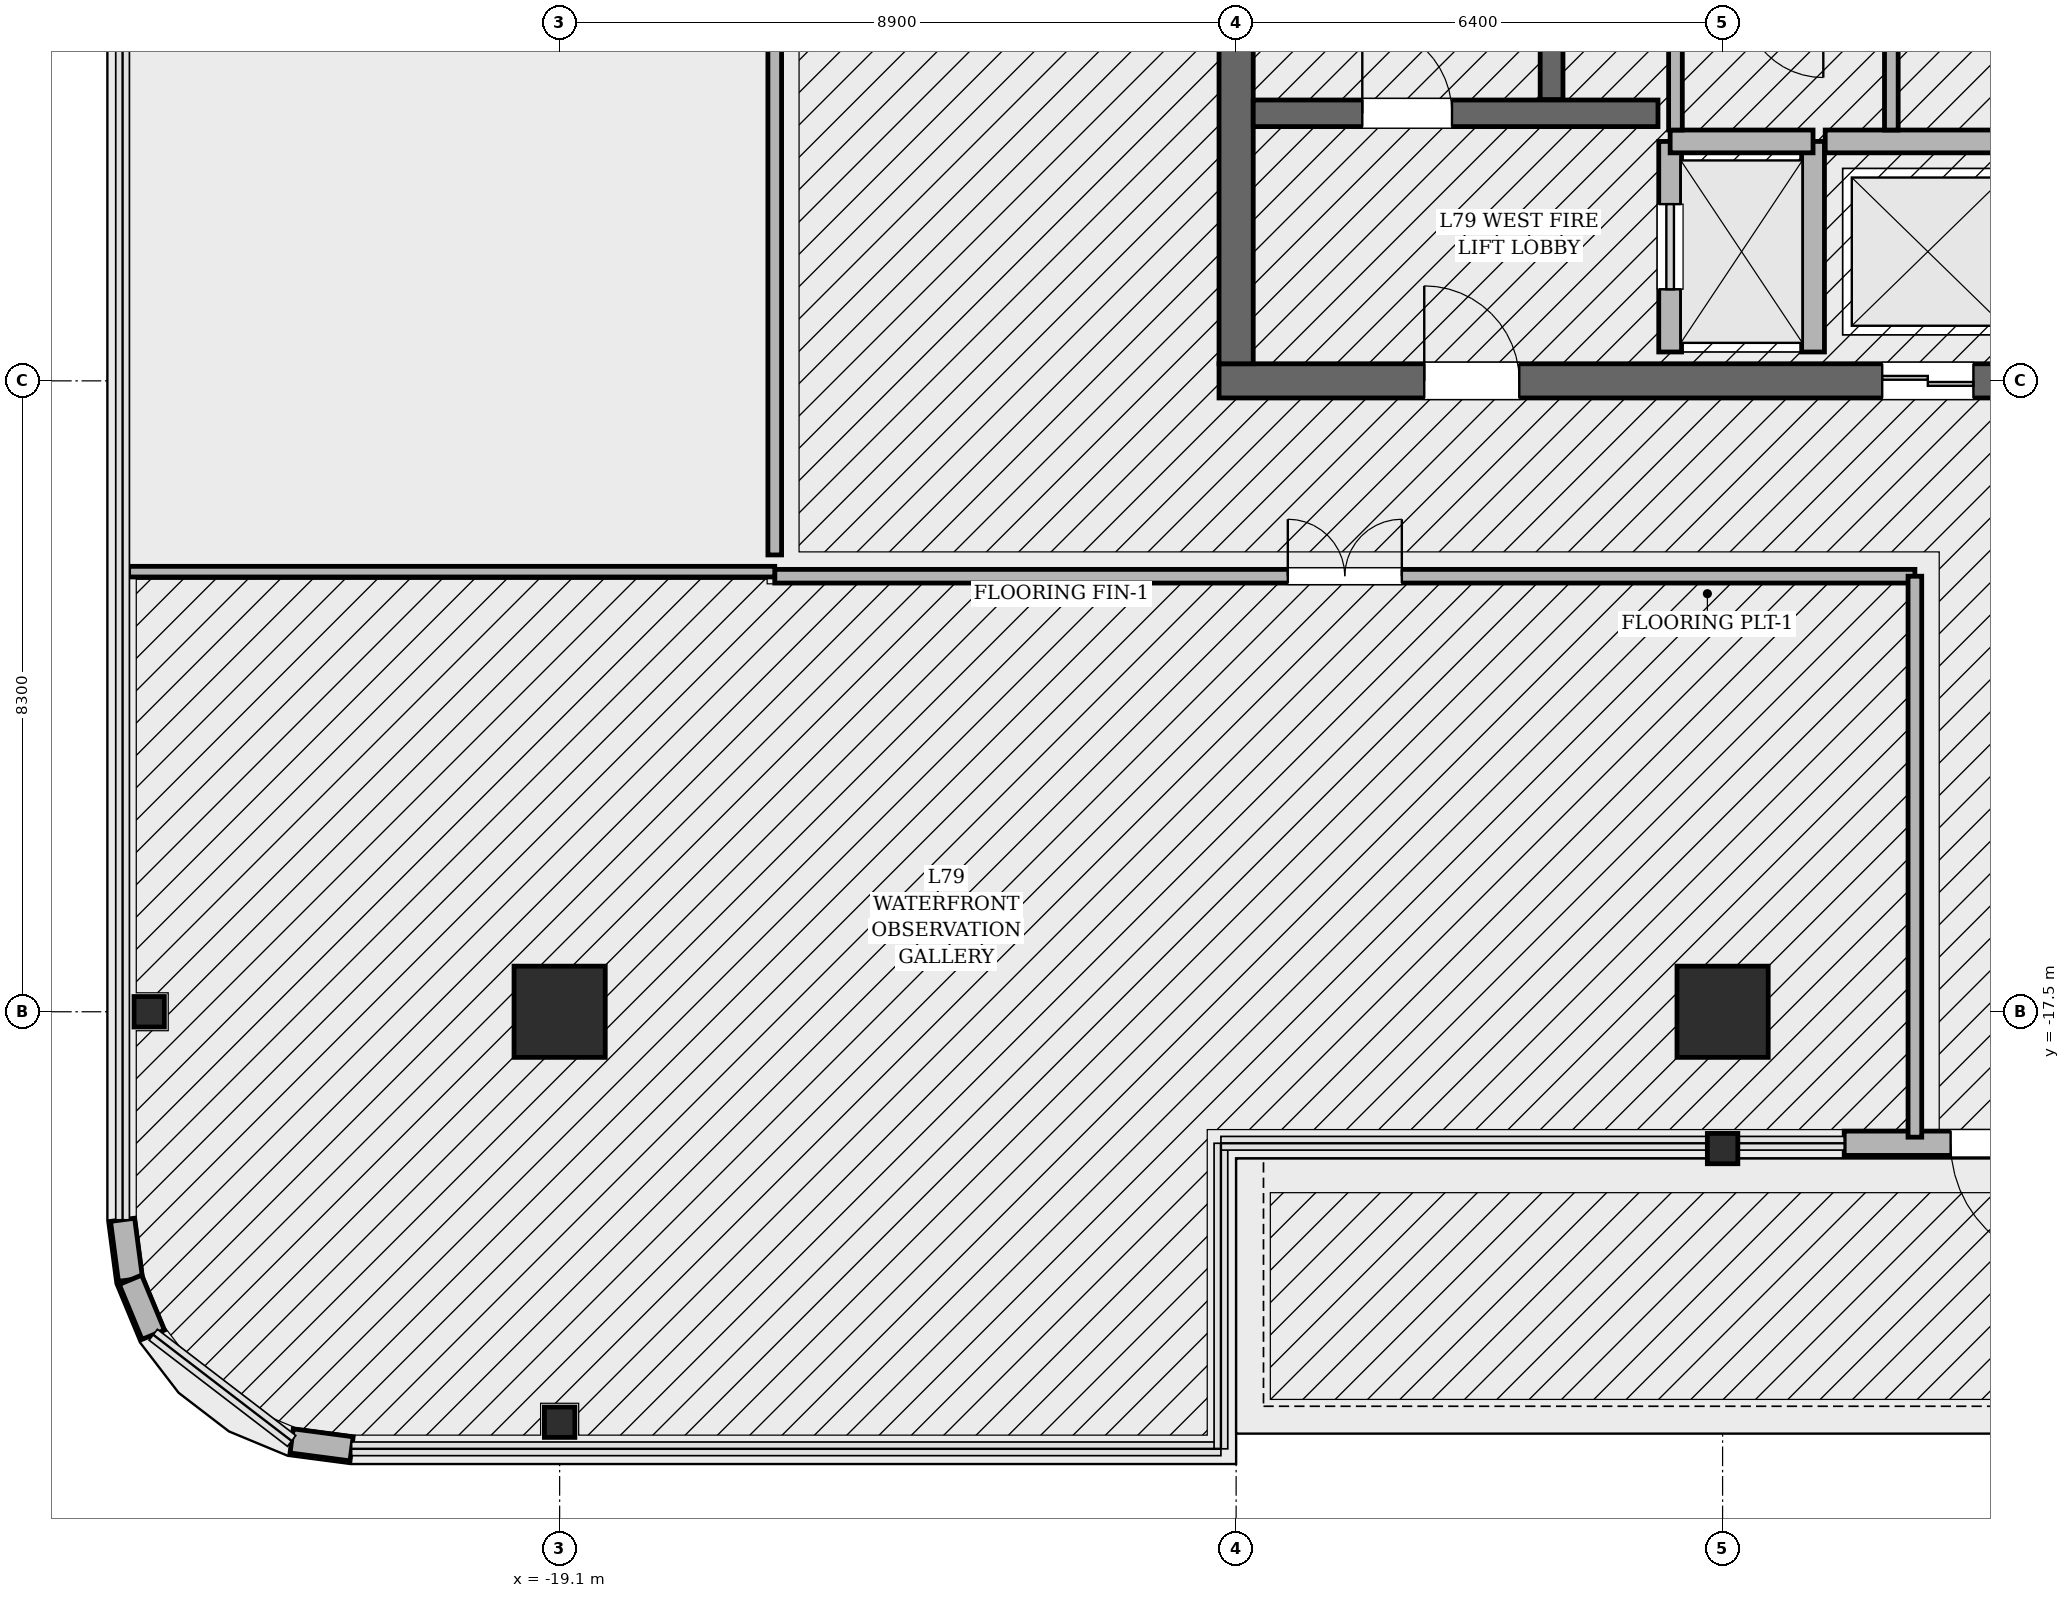
"""IFC4 building model, lengths in metres.
Left out: names, types, materials, properties, quantities, classifications, styles, units other than length and angle.
Written with IfcOpenShell. Run it as: python <this file> out.ifc"""

import sys

from ifc_helpers import new_model, si_unit, direction, frame, frame_2d, origin, origin_2d, place, context, subcontext, project, spatial, rectangle, hollow_rectangle, i_section, extrude, element, fill, save


model = new_model("IFC4")
c1 = context("Model", 3, precision=1e-05, world=origin(), true_north=direction((0.0, 1.0)))
c2 = subcontext(c1, "Body", "Model", "MODEL_VIEW")
j1 = project(units=[si_unit("LENGTHUNIT", "METRE"), si_unit("PLANEANGLEUNIT", "RADIAN")], contexts=[c1])
p1 = place(None, origin())
s1 = spatial("IfcSite", under=j1, at=p1, CompositionType="ELEMENT")
p2 = place(p1, origin())
s2 = spatial("IfcBuilding", under=s1, at=p2, CompositionType="ELEMENT")
p3 = place(p2, frame((0.0, 0.0, 334.2)))
s3 = spatial("IfcBuildingStorey", under=s2, at=p3, CompositionType="ELEMENT", Elevation=334.2)
p4 = place(p3, frame((10.425, -9.2, 0.0), z_axis=(0.0, 0.0, 1.0), x_axis=(-1.0, 0.0, 0.0)))
e1 = element("IfcWall", 1, at=p4, inside=s3, PredefinedType="SHEAR", context=c2, shape_type="SweptSolid", body=[
    extrude(rectangle(XDim=20.85, YDim=0.45, at=frame_2d((10.425, 0.0))), origin(), (0.0, 0.0, 1.0), 4.8),
])
p5 = place(p4, frame((2.7, 0.0, 0.0)))
e2 = element("IfcOpeningElement", 2, at=p5, cuts=e1, PredefinedType="OPENING", context=c2, shape_type="SweptSolid", body=[
    extrude(rectangle(XDim=1.25, YDim=2.25, at=frame_2d((0.625, 1.125))), frame((0.0, 0.235, 0.0), z_axis=(0.0, -1.0, 0.0), x_axis=(1.0, 0.0, 0.0)), (0.0, 0.0, 1.0), 0.47),
])
p6 = place(p4, frame((16.9, 0.0, 0.0)))
e3 = element("IfcOpeningElement", 3, at=p6, cuts=e1, PredefinedType="OPENING", context=c2, shape_type="SweptSolid", body=[
    extrude(rectangle(XDim=1.25, YDim=2.25, at=frame_2d((0.625, 1.125))), frame((0.0, 0.235, 0.0), z_axis=(0.0, -1.0, 0.0), x_axis=(1.0, 0.0, 0.0)), (0.0, 0.0, 1.0), 0.47),
])
p7 = place(p4, frame((10.925, 0.0, 0.0)))
e4 = element("IfcOpeningElement", 4, at=p7, cuts=e1, PredefinedType="OPENING", context=c2, shape_type="SweptSolid", body=[
    extrude(rectangle(XDim=1.2, YDim=2.3, at=frame_2d((0.6, 1.15))), frame((0.0, 0.235, 0.0), z_axis=(0.0, -1.0, 0.0), x_axis=(1.0, 0.0, 0.0)), (0.0, 0.0, 1.0), 0.47),
])
p8 = place(p4, frame((8.725, 0.0, 0.0)))
e5 = element("IfcOpeningElement", 5, at=p8, cuts=e1, PredefinedType="OPENING", context=c2, shape_type="SweptSolid", body=[
    extrude(rectangle(XDim=1.2, YDim=2.3, at=frame_2d((0.6, 1.15))), frame((0.0, 0.235, 0.0), z_axis=(0.0, -1.0, 0.0), x_axis=(1.0, 0.0, 0.0)), (0.0, 0.0, 1.0), 0.47),
])
p9 = place(p3, frame((-10.2, -8.975, 0.0), z_axis=(0.0, 0.0, 1.0), x_axis=(0.0, 1.0, 0.0)))
e6 = element("IfcWall", 6, at=p9, inside=s3, PredefinedType="SHEAR", context=c2, shape_type="SweptSolid", body=[
    extrude(rectangle(XDim=17.95, YDim=0.45, at=frame_2d((8.975, 0.0))), origin(), (0.0, 0.0, 1.0), 4.8),
])
p10 = place(p9, frame((12.765, 0.0, 0.0)))
e7 = element("IfcOpeningElement", 7, at=p10, cuts=e6, PredefinedType="OPENING", context=c2, shape_type="SweptSolid", body=[
    extrude(rectangle(XDim=1.18, YDim=2.2, at=frame_2d((0.59, 1.1))), frame((0.0, 0.235, 0.0), z_axis=(0.0, -1.0, 0.0), x_axis=(1.0, 0.0, 0.0)), (0.0, 0.0, 1.0), 0.47),
])
p11 = place(p3, frame((-6.05, -5.5, 0.0), z_axis=(0.0, 0.0, 1.0), x_axis=(0.0, 1.0, 0.0)))
e8 = element("IfcWall", 8, at=p11, inside=s3, PredefinedType="SOLIDWALL", context=c2, shape_type="SweptSolid", body=[
    extrude(rectangle(XDim=8.95, YDim=0.3, at=frame_2d((4.475, 0.0))), origin(), (0.0, 0.0, 1.0), 4.8),
])
p12 = place(p3, frame((-9.975, -5.68, 0.0), z_axis=(0.0, 0.0, 1.0), x_axis=(1.0, 0.0, 0.0)))
e9 = element("IfcWall", 9, at=p12, inside=s3, PredefinedType="SOLIDWALL", context=c2, shape_type="SweptSolid", body=[
    extrude(rectangle(XDim=5.325, YDim=0.35, at=frame_2d((2.663, 0.0))), origin(), (0.0, 0.0, 1.0), 4.8),
])
p13 = place(p12, frame((1.435, 0.0, 0.0)))
e10 = element("IfcOpeningElement", 10, at=p13, cuts=e9, PredefinedType="OPENING", context=c2, shape_type="SweptSolid", body=[
    extrude(rectangle(XDim=1.18, YDim=2.2, at=frame_2d((0.59, 1.1))), frame((0.0, 0.185, 0.0), z_axis=(0.0, -1.0, 0.0), x_axis=(1.0, 0.0, 0.0)), (0.0, 0.0, 1.0), 0.37),
])
for number, where, z_axis, x_axis in (
    (11, (-19.1, -17.5, 0.0), (0.0, 0.0, 1.0), (1.0, 0.0, 0.0)),
    (12, (-3.8, -17.5, 0.0), (0.0, 0.0, 1.0), (1.0, 0.0, 0.0)),
):
    element("IfcColumn", number, at=place(p3, frame(where, z_axis=z_axis, x_axis=x_axis)), inside=s3, PredefinedType="COLUMN", context=c2, shape_type="SweptSolid", body=[
        extrude(hollow_rectangle(XDim=1.2, YDim=1.2, WallThickness=0.035, at=origin_2d()), origin(), (0.0, 0.0, 1.0), 4.8),
    ])
for number, where, z_axis, x_axis in (
    (13, (-19.1, -22.9, 0.0), (0.0, 0.0, 1.0), (1.0, 0.0, 0.0)),
    (14, (-3.8, -19.3, 0.0), (0.0, 0.0, 1.0), (1.0, 0.0, 0.0)),
    (15, (-24.5, -17.5, 0.0), (0.0, 0.0, 1.0), (0.0, 1.0, 0.0)),
):
    element("IfcColumn", number, at=place(p3, frame(where, z_axis=z_axis, x_axis=x_axis)), inside=s3, PredefinedType="COLUMN", context=c2, shape_type="SweptSolid", body=[
        extrude(i_section(OverallWidth=0.401, OverallDepth=0.399, WebThickness=0.025, FlangeThickness=0.04, FilletRadius=0.018, at=origin_2d()), origin(), (0.0, 0.0, 1.0), 4.798),
    ])
p14 = place(p3, frame((-22.626, -23.146, 0.0), z_axis=(0.0, 0.0, 1.0), x_axis=(0.991425036208, -0.130676691035, 0.0)))
e16 = element("IfcWall", 16, at=p14, inside=s3, PredefinedType="SOLIDWALL", context=c2, shape_type="SweptSolid", body=[
    extrude(rectangle(XDim=0.796, YDim=0.32, at=frame_2d((0.398, 0.0))), origin(), (0.0, 0.0, 1.0), 4.54),
])
p15 = place(p3, frame((-2.2, -19.23, 0.0), z_axis=(0.0, 0.0, 1.0), x_axis=(1.0, 0.0, 0.0)))
e17 = element("IfcWall", 17, at=p15, inside=s3, PredefinedType="SOLIDWALL", context=c2, shape_type="SweptSolid", body=[
    extrude(rectangle(XDim=4.4, YDim=0.32, at=frame_2d((2.2, 0.0))), origin(), (0.0, 0.0, 1.0), 4.54),
])
p16 = place(p15, frame((1.4, 0.0, 0.0)))
e18 = element("IfcOpeningElement", 18, at=p16, cuts=e17, PredefinedType="OPENING", context=c2, shape_type="SweptSolid", body=[
    extrude(rectangle(XDim=1.6, YDim=2.35, at=frame_2d((0.8, 1.175))), frame((0.0, 0.17, 0.0), z_axis=(0.0, -1.0, 0.0), x_axis=(1.0, 0.0, 0.0)), (0.0, 0.0, 1.0), 0.34),
])
p17 = place(p3, frame((-24.85, -20.237, 0.0), z_axis=(0.0, 0.0, 1.0), x_axis=(0.130676691035, -0.991425036208, 0.0)))
e19 = element("IfcWall", 19, at=p17, inside=s3, PredefinedType="SOLIDWALL", context=c2, shape_type="SweptSolid", body=[
    extrude(rectangle(XDim=0.796, YDim=0.32, at=frame_2d((0.398, 0.0))), origin(), (0.0, 0.0, 1.0), 4.54),
])
p18 = place(p3, frame((-24.746, -21.026, 0.0), z_axis=(0.0, 0.0, 1.0), x_axis=(0.38270990292, -0.923868567604, 0.0)))
e20 = element("IfcWall", 20, at=p18, inside=s3, PredefinedType="SOLIDWALL", context=c2, shape_type="SweptSolid", body=[
    extrude(rectangle(XDim=0.783, YDim=0.32, at=frame_2d((0.391, 0.0))), origin(), (0.0, 0.0, 1.0), 4.54),
])
p19 = place(p3, frame((-4.49, -8.82, 0.0), z_axis=(0.0, 0.0, 1.0), x_axis=(0.0, 1.0, 0.0)))
e21 = element("IfcWall", 21, at=p19, inside=s3, PredefinedType="SOLIDWALL", context=c2, shape_type="SweptSolid", body=[
    extrude(rectangle(XDim=2.77, YDim=0.3, at=frame_2d((1.385, 0.0))), origin(), (0.0, 0.0, 1.0), 4.54),
])
p20 = place(p19, frame((0.825, 0.0, 0.0)))
e22 = element("IfcOpeningElement", 22, at=p20, cuts=e21, PredefinedType="OPENING", context=c2, shape_type="SweptSolid", body=[
    extrude(rectangle(XDim=1.12, YDim=2.25, at=frame_2d((0.56, 1.125))), frame((0.0, 0.16, 0.0), z_axis=(0.0, -1.0, 0.0), x_axis=(1.0, 0.0, 0.0)), (0.0, 0.0, 1.0), 0.32),
])
p21 = place(p3, frame((-2.61, -8.82, 0.0), z_axis=(0.0, 0.0, 1.0), x_axis=(0.0, 1.0, 0.0)))
e23 = element("IfcWall", 23, at=p21, inside=s3, PredefinedType="SOLIDWALL", context=c2, shape_type="SweptSolid", body=[
    extrude(rectangle(XDim=2.77, YDim=0.3, at=frame_2d((1.385, 0.0))), origin(), (0.0, 0.0, 1.0), 4.54),
])
p22 = place(p3, frame((-4.49, -6.05, 0.0), z_axis=(0.0, 0.0, 1.0), x_axis=(1.0, 0.0, 0.0)))
e24 = element("IfcWall", 24, at=p22, inside=s3, PredefinedType="SOLIDWALL", context=c2, shape_type="SweptSolid", body=[
    extrude(rectangle(XDim=1.88, YDim=0.3, at=frame_2d((0.94, 0.0))), origin(), (0.0, 0.0, 1.0), 4.54),
])
p23 = place(p3, frame((-2.45, -6.05, 0.0), z_axis=(0.0, 0.0, 1.0), x_axis=(1.0, 0.0, 0.0)))
e25 = element("IfcWall", 25, at=p23, inside=s3, PredefinedType="SOLIDWALL", context=c2, shape_type="SweptSolid", body=[
    extrude(rectangle(XDim=4.9, YDim=0.3, at=frame_2d((2.45, 0.0))), origin(), (0.0, 0.0, 1.0), 4.54),
])
for number, where, z_axis, x_axis in (
    (26, (-1.58, -5.9, 0.0), (0.0, 0.0, 1.0), (0.0, 1.0, 0.0)),
    (27, (-4.42, -4.16, 0.0), (0.0, 0.0, 1.0), (0.0, -1.0, 0.0)),
):
    element("IfcWall", number, at=place(p3, frame(where, z_axis=z_axis, x_axis=x_axis)), inside=s3, PredefinedType="PARTITIONING", context=c2, shape_type="SweptSolid", body=[
        extrude(rectangle(XDim=1.74, YDim=0.18, at=frame_2d((0.87, 0.0))), origin(), (0.0, 0.0, 1.0), 4.54),
    ])
p24 = place(p3, frame((-16.27, -11.77, 0.0), z_axis=(0.0, 0.0, 1.0), x_axis=(1.0, 0.0, 0.0)))
e28 = element("IfcWall", 28, at=p24, inside=s3, PredefinedType="PARTITIONING", context=c2, shape_type="SweptSolid", body=[
    extrude(rectangle(XDim=15.0, YDim=0.18, at=frame_2d((7.5, 0.0))), origin(), (0.0, 0.0, 1.0), 3.214),
])
p25 = place(p24, frame((6.75, 0.0, 0.0)))
e29 = element("IfcOpeningElement", 29, at=p25, cuts=e28, PredefinedType="OPENING", context=c2, shape_type="SweptSolid", body=[
    extrude(rectangle(XDim=1.5, YDim=2.3, at=frame_2d((0.75, 1.15))), frame((0.0, 0.1, 0.0), z_axis=(0.0, -1.0, 0.0), x_axis=(1.0, 0.0, 0.0)), (0.0, 0.0, 1.0), 0.2),
])
p26 = place(p3, frame((-1.27, -11.77, 0.0), z_axis=(0.0, 0.0, 1.0), x_axis=(0.0, -1.0, 0.0)))
e30 = element("IfcWall", 30, at=p26, inside=s3, PredefinedType="PARTITIONING", context=c2, shape_type="SweptSolid", body=[
    extrude(rectangle(XDim=7.38, YDim=0.18, at=frame_2d((3.69, 0.0))), origin(), (0.0, 0.0, 1.0), 3.214),
])
p27 = place(p3, frame((-24.77, -11.71, 0.0), z_axis=(0.0, 0.0, 1.0), x_axis=(1.0, 0.0, 0.0)))
e31 = element("IfcWall", 31, at=p27, inside=s3, PredefinedType="PARTITIONING", context=c2, shape_type="SweptSolid", body=[
    extrude(rectangle(XDim=8.5, YDim=0.14, at=frame_2d((4.25, 0.0))), origin(), (0.0, 0.0, 1.0), 3.214),
])
p28 = place(p3, frame((-16.27, 13.82, 0.0), z_axis=(0.0, 0.0, 1.0), x_axis=(0.0, -1.0, 0.0)))
e32 = element("IfcWall", 32, at=p28, inside=s3, PredefinedType="PARTITIONING", context=c2, shape_type="SweptSolid", body=[
    extrude(rectangle(XDim=25.31, YDim=0.18, at=frame_2d((12.655, 0.0))), origin(), (0.0, 0.0, 1.0), 3.214),
])
p29 = place(p28, frame((12.13, 0.0, 0.0)))
e33 = element("IfcOpeningElement", 33, at=p29, cuts=e32, PredefinedType="OPENING", context=c2, shape_type="SweptSolid", body=[
    extrude(rectangle(XDim=1.05, YDim=2.2, at=frame_2d((0.525, 1.1))), frame((0.0, 0.1, 0.0), z_axis=(0.0, -1.0, 0.0), x_axis=(1.0, 0.0, 0.0)), (0.0, 0.0, 1.0), 0.2),
])
p30 = place(p16, origin())
e34 = element("IfcDoor", 34, at=p30, inside=s3, OperationType="SINGLE_SWING_RIGHT", PredefinedType="DOOR", context=c2, shape_type="SweptSolid", body=[
    extrude(rectangle(XDim=1.6, YDim=2.35, at=frame_2d((0.8, 1.175))), frame((0.0, 0.025, 0.0), z_axis=(0.0, -1.0, 0.0), x_axis=(1.0, 0.0, 0.0)), (0.0, 0.0, 1.0), 0.05),
])
fill(e18, e34)
p31 = place(p13, origin())
e35 = element("IfcDoor", 35, at=p31, inside=s3, OperationType="SINGLE_SWING_LEFT", PredefinedType="DOOR", context=c2, shape_type="SweptSolid", body=[
    extrude(rectangle(XDim=1.18, YDim=2.2, at=frame_2d((0.59, 1.1))), frame((0.0, 0.025, 0.0), z_axis=(0.0, -1.0, 0.0), x_axis=(1.0, 0.0, 0.0)), (0.0, 0.0, 1.0), 0.05),
])
fill(e10, e35)
p32 = place(p6, origin())
e36 = element("IfcDoor", 36, at=p32, inside=s3, OperationType="SINGLE_SWING_RIGHT", PredefinedType="DOOR", context=c2, shape_type="SweptSolid", body=[
    extrude(rectangle(XDim=1.25, YDim=2.25, at=frame_2d((0.625, 1.125))), frame((0.0, 0.025, 0.0), z_axis=(0.0, -1.0, 0.0), x_axis=(1.0, 0.0, 0.0)), (0.0, 0.0, 1.0), 0.05),
])
fill(e3, e36)
p33 = place(p20, origin())
e37 = element("IfcDoor", 37, at=p33, inside=s3, OperationType="SLIDING_TO_LEFT", PredefinedType="DOOR", context=c2, shape_type="SweptSolid", body=[
    extrude(rectangle(XDim=1.12, YDim=2.25, at=frame_2d((0.56, 1.125))), frame((0.0, 0.025, 0.0), z_axis=(0.0, -1.0, 0.0), x_axis=(1.0, 0.0, 0.0)), (0.0, 0.0, 1.0), 0.05),
])
fill(e22, e37)
p34 = place(p7, origin())
e38 = element("IfcDoor", 38, at=p34, inside=s3, OperationType="DOUBLE_DOOR_SLIDING", PredefinedType="DOOR", context=c2, shape_type="SweptSolid", body=[
    extrude(rectangle(XDim=1.2, YDim=2.3, at=frame_2d((0.6, 1.15))), frame((0.0, 0.025, 0.0), z_axis=(0.0, -1.0, 0.0), x_axis=(1.0, 0.0, 0.0)), (0.0, 0.0, 1.0), 0.05),
])
fill(e4, e38)
p35 = place(p25, origin())
e39 = element("IfcDoor", 39, at=p35, inside=s3, OperationType="DOUBLE_DOOR_SINGLE_SWING", PredefinedType="DOOR", context=c2, shape_type="SweptSolid", body=[
    extrude(rectangle(XDim=1.5, YDim=2.3, at=frame_2d((0.75, 1.15))), frame((0.0, 0.025, 0.0), z_axis=(0.0, -1.0, 0.0), x_axis=(1.0, 0.0, 0.0)), (0.0, 0.0, 1.0), 0.05),
])
fill(e29, e39)
save(model, sys.argv[1])
